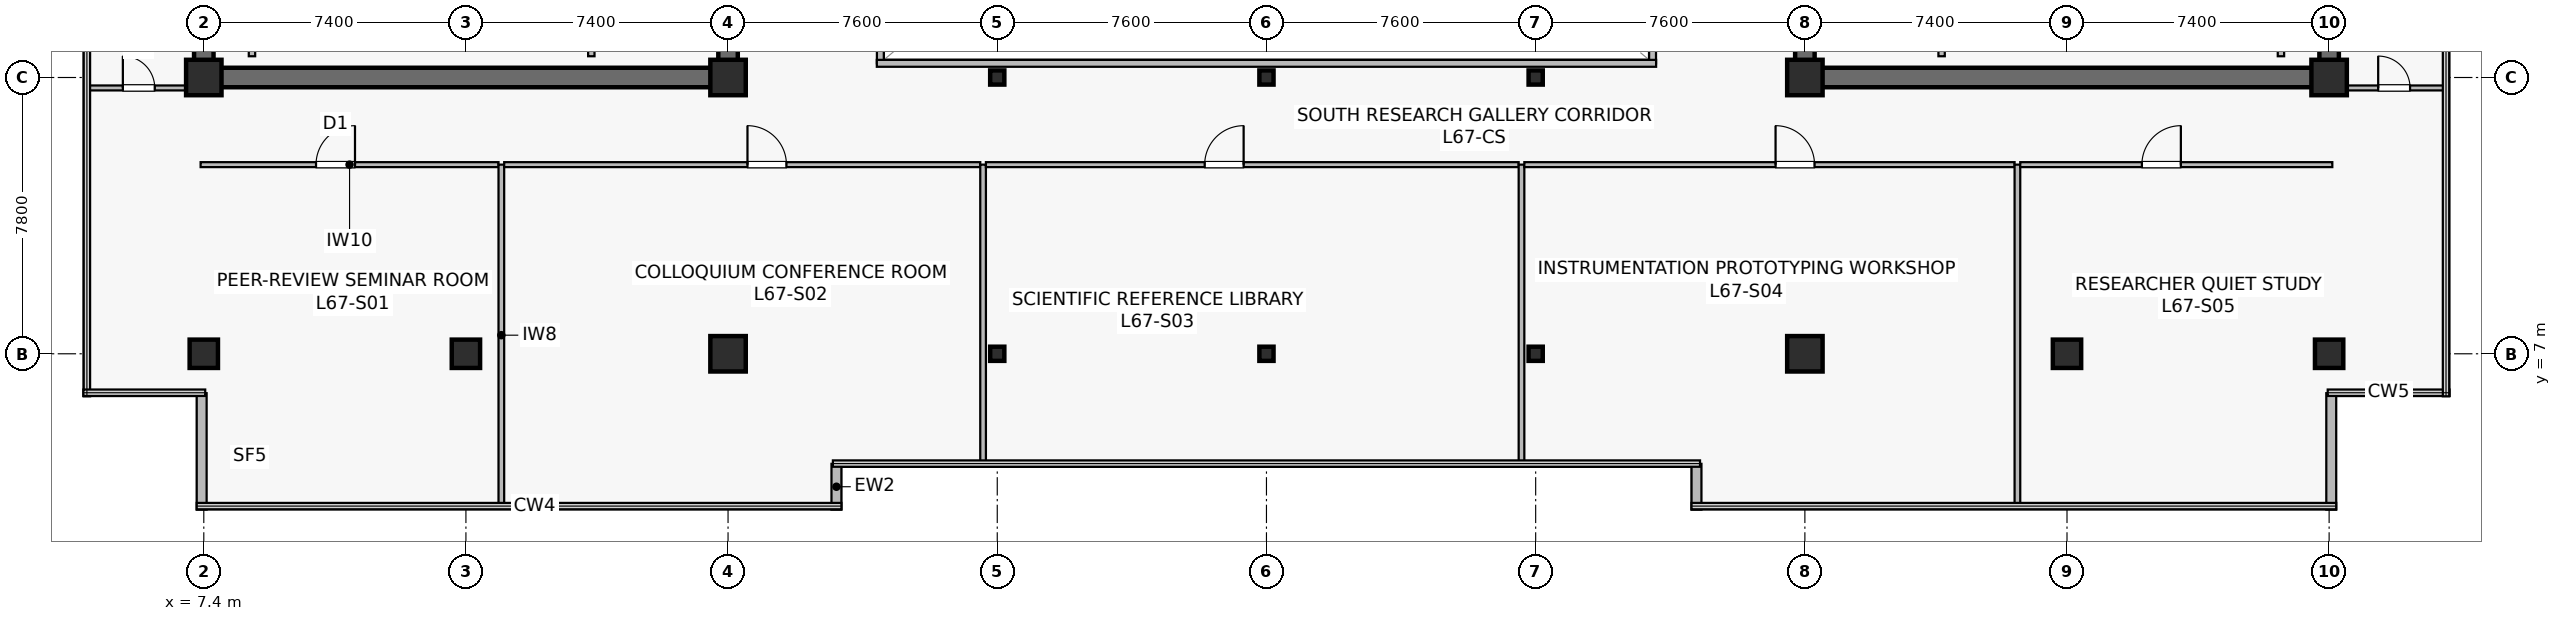
"""IFC4 building model, lengths in metres.
Left out: names, types, materials, properties, quantities, classifications, styles, units other than length and angle.
Written with IfcOpenShell. Run it as: python <this file> out.ifc"""

import sys

from ifc_helpers import new_model, si_unit, direction, frame, frame_2d, origin, origin_2d, place, context, subcontext, project, spatial, rectangle, hollow_rectangle, extrude, source, transform, mapped, element, fill, save


model = new_model("IFC4")
c1 = context("Model", 3, precision=1e-05, world=origin(), true_north=direction((0.0, 1.0)))
c2 = subcontext(c1, "Body", "Model", "MODEL_VIEW")
j1 = project(units=[si_unit("LENGTHUNIT", "METRE"), si_unit("PLANEANGLEUNIT", "RADIAN")], contexts=[c1])
p1 = place(None, origin())
s1 = spatial("IfcSite", under=j1, at=p1, CompositionType="ELEMENT")
p2 = place(p1, origin())
s2 = spatial("IfcBuilding", under=s1, at=p2, CompositionType="ELEMENT")
p3 = place(p2, frame((0.0, 0.0, 279.3)))
s3 = spatial("IfcBuildingStorey", under=s2, at=p3, CompositionType="ELEMENT", Elevation=279.3)
p4 = place(p3, frame((7.125, 14.8, 0.0), z_axis=(0.0, 0.0, 1.0), x_axis=(1.0, 0.0, 0.0)))
e1 = element("IfcWall", 1, at=p4, inside=s3, PredefinedType="SHEAR", context=c2, shape_type="SweptSolid", body=[
    extrude(rectangle(XDim=15.35, YDim=0.55, at=frame_2d((7.675, 0.0))), origin(), (0.0, 0.0, 1.0), 3.8),
])
p5 = place(p3, frame((7.4, 15.075, 0.0), z_axis=(0.0, 0.0, 1.0), x_axis=(0.0, 1.0, 0.0)))
e2 = element("IfcWall", 2, at=p5, inside=s3, PredefinedType="SHEAR", context=c2, shape_type="SweptSolid", body=[
    extrude(rectangle(XDim=18.45, YDim=0.55, at=frame_2d((9.225, 0.0))), origin(), (0.0, 0.0, 1.0), 3.8),
])
p6 = place(p3, frame((22.2, 15.075, 0.0), z_axis=(0.0, 0.0, 1.0), x_axis=(0.0, 1.0, 0.0)))
e3 = element("IfcWall", 3, at=p6, inside=s3, PredefinedType="SHEAR", context=c2, shape_type="SweptSolid", body=[
    extrude(rectangle(XDim=18.45, YDim=0.55, at=frame_2d((9.225, 0.0))), origin(), (0.0, 0.0, 1.0), 3.8),
])
p7 = place(p6, frame((3.475, 0.0, 0.0)))
e4 = element("IfcOpeningElement", 4, at=p7, cuts=e3, PredefinedType="OPENING", context=c2, shape_type="SweptSolid", body=[
    extrude(rectangle(XDim=1.42, YDim=2.2, at=frame_2d((0.71, 1.1))), frame((0.0, 0.285, 0.0), z_axis=(0.0, -1.0, 0.0), x_axis=(1.0, 0.0, 0.0)), (0.0, 0.0, 1.0), 0.57),
])
p8 = place(p3, frame((52.325, 14.8, 0.0), z_axis=(0.0, 0.0, 1.0), x_axis=(1.0, 0.0, 0.0)))
e5 = element("IfcWall", 5, at=p8, inside=s3, PredefinedType="SHEAR", context=c2, shape_type="SweptSolid", body=[
    extrude(rectangle(XDim=15.35, YDim=0.55, at=frame_2d((7.675, 0.0))), origin(), (0.0, 0.0, 1.0), 3.8),
])
p9 = place(p3, frame((52.6, 15.075, 0.0), z_axis=(0.0, 0.0, 1.0), x_axis=(0.0, 1.0, 0.0)))
e6 = element("IfcWall", 6, at=p9, inside=s3, PredefinedType="SHEAR", context=c2, shape_type="SweptSolid", body=[
    extrude(rectangle(XDim=18.45, YDim=0.55, at=frame_2d((9.225, 0.0))), origin(), (0.0, 0.0, 1.0), 3.8),
])
p10 = place(p9, frame((3.475, 0.0, 0.0)))
e7 = element("IfcOpeningElement", 7, at=p10, cuts=e6, PredefinedType="OPENING", context=c2, shape_type="SweptSolid", body=[
    extrude(rectangle(XDim=1.42, YDim=2.2, at=frame_2d((0.71, 1.1))), frame((0.0, 0.285, 0.0), z_axis=(0.0, -1.0, 0.0), x_axis=(1.0, 0.0, 0.0)), (0.0, 0.0, 1.0), 0.57),
])
p11 = place(p3, frame((67.4, 15.075, 0.0), z_axis=(0.0, 0.0, 1.0), x_axis=(0.0, 1.0, 0.0)))
e8 = element("IfcWall", 8, at=p11, inside=s3, PredefinedType="SHEAR", context=c2, shape_type="SweptSolid", body=[
    extrude(rectangle(XDim=18.45, YDim=0.55, at=frame_2d((9.225, 0.0))), origin(), (0.0, 0.0, 1.0), 3.8),
])
m1 = source(origin(), c2, "Body", "SweptSolid", [
    extrude(rectangle(XDim=0.8, YDim=0.8, at=origin_2d()), origin(), (0.0, 0.0, 1.0), 4.1),
])
p12 = place(p3, frame((14.8, 7.0, 0.0), z_axis=(0.0, 0.0, 1.0), x_axis=(1.0, 0.0, 0.0)))
e9 = element("IfcColumn", 9, at=p12, inside=s3, PredefinedType="COLUMN", context=c2, shape_type="MappedRepresentation", body=[
    mapped(m1, transform((0.0, 0.0, 0.0), scale=1.0)),
])
m2 = source(origin(), c2, "Body", "SweptSolid", [
    extrude(rectangle(XDim=1.0, YDim=1.0, at=origin_2d()), origin(), (0.0, 0.0, 1.0), 4.1),
])
for number, where, z_axis, x_axis in (
    (10, (22.2, 7.0, 0.0), (0.0, 0.0, 1.0), (1.0, 0.0, 0.0)),
    (11, (7.4, 14.8, 0.0), (0.0, 0.0, 1.0), (1.0, 0.0, 0.0)),
    (12, (22.2, 14.8, 0.0), (0.0, 0.0, 1.0), (1.0, 0.0, 0.0)),
    (13, (52.6, 7.0, 0.0), (0.0, 0.0, 1.0), (1.0, 0.0, 0.0)),
):
    element("IfcColumn", number, at=place(p3, frame(where, z_axis=z_axis, x_axis=x_axis)), inside=s3, PredefinedType="COLUMN", context=c2, shape_type="MappedRepresentation", body=[
        mapped(m2, transform((0.0, 0.0, 0.0), scale=1.0)),
    ])
p13 = place(p3, frame((60.0, 7.0, 0.0), z_axis=(0.0, 0.0, 1.0), x_axis=(1.0, 0.0, 0.0)))
e14 = element("IfcColumn", 14, at=p13, inside=s3, PredefinedType="COLUMN", context=c2, shape_type="MappedRepresentation", body=[
    mapped(m1, transform((0.0, 0.0, 0.0), scale=1.0)),
])
for number, where, z_axis, x_axis in (
    (15, (52.6, 14.8, 0.0), (0.0, 0.0, 1.0), (1.0, 0.0, 0.0)),
    (16, (67.4, 14.8, 0.0), (0.0, 0.0, 1.0), (1.0, 0.0, 0.0)),
):
    element("IfcColumn", number, at=place(p3, frame(where, z_axis=z_axis, x_axis=x_axis)), inside=s3, PredefinedType="COLUMN", context=c2, shape_type="MappedRepresentation", body=[
        mapped(m2, transform((0.0, 0.0, 0.0), scale=1.0)),
    ])
for number, where, z_axis, x_axis in (
    (17, (7.4, 7.0, 0.0), (0.0, 0.0, 1.0), (1.0, 0.0, 0.0)),
    (18, (67.4, 7.0, 0.0), (0.0, 0.0, 1.0), (1.0, 0.0, 0.0)),
):
    element("IfcColumn", number, at=place(p3, frame(where, z_axis=z_axis, x_axis=x_axis)), inside=s3, PredefinedType="COLUMN", context=c2, shape_type="MappedRepresentation", body=[
        mapped(m1, transform((0.0, 0.0, 0.0), scale=1.0)),
    ])
m3 = source(origin(), c2, "Body", "SweptSolid", [
    extrude(hollow_rectangle(XDim=0.4, YDim=0.4, WallThickness=0.019, at=origin_2d()), origin(), (0.0, 0.0, 1.0), 4.1),
])
for number, where, z_axis, x_axis in (
    (19, (29.8, 7.0, 0.0), (0.0, 0.0, 1.0), (1.0, 0.0, 0.0)),
    (20, (29.8, 14.8, 0.0), (0.0, 0.0, 1.0), (1.0, 0.0, 0.0)),
    (21, (37.4, 7.0, 0.0), (0.0, 0.0, 1.0), (1.0, 0.0, 0.0)),
    (22, (37.4, 14.8, 0.0), (0.0, 0.0, 1.0), (1.0, 0.0, 0.0)),
    (23, (45.0, 7.0, 0.0), (0.0, 0.0, 1.0), (1.0, 0.0, 0.0)),
    (24, (45.0, 14.8, 0.0), (0.0, 0.0, 1.0), (1.0, 0.0, 0.0)),
):
    element("IfcColumn", number, at=place(p3, frame(where, z_axis=z_axis, x_axis=x_axis)), inside=s3, PredefinedType="COLUMN", context=c2, shape_type="MappedRepresentation", body=[
        mapped(m3, transform((0.0, 0.0, 0.0), scale=1.0)),
    ])
for number, where, z_axis, x_axis in (
    (25, (25.26, 2.6, 0.0), (0.0, 0.0, 1.0), (0.0, 1.0, 0.0)),
    (26, (49.54, 3.893, 0.0), (0.0, 0.0, 1.0), (0.0, -1.0, 0.0)),
):
    element("IfcWall", number, at=place(p3, frame(where, z_axis=z_axis, x_axis=x_axis)), inside=s3, PredefinedType="STANDARD", context=c2, shape_type="SweptSolid", body=[
        extrude(rectangle(XDim=1.293, YDim=0.28, at=frame_2d((0.646, 0.0))), origin(), (0.0, 0.0, 1.0), 3.8),
    ])
for number, where, z_axis, x_axis in (
    (27, (67.46, 2.6, 0.0), (0.0, 0.0, 1.0), (0.0, 1.0, 0.0)),
    (28, (7.34, 5.888, 0.0), (0.0, 0.0, 1.0), (0.0, -1.0, 0.0)),
):
    element("IfcWall", number, at=place(p3, frame(where, z_axis=z_axis, x_axis=x_axis)), inside=s3, PredefinedType="STANDARD", context=c2, shape_type="SweptSolid", body=[
        extrude(rectangle(XDim=3.288, YDim=0.28, at=frame_2d((1.644, 0.0))), origin(), (0.0, 0.0, 1.0), 3.8),
    ])
for number, where, z_axis, x_axis in (
    (29, (18.34, 15.4, 0.0), (0.0, 0.0, 1.0), (0.0, 1.0, 0.0)),
    (30, (8.76, 15.4, 0.0), (0.0, 0.0, 1.0), (0.0, 1.0, 0.0)),
    (31, (56.46, 15.4, 0.0), (0.0, 0.0, 1.0), (0.0, 1.0, 0.0)),
    (32, (66.04, 15.4, 0.0), (0.0, 0.0, 1.0), (0.0, 1.0, 0.0)),
):
    element("IfcWall", number, at=place(p3, frame(where, z_axis=z_axis, x_axis=x_axis)), inside=s3, PredefinedType="SOLIDWALL", context=c2, shape_type="SweptSolid", body=[
        extrude(rectangle(XDim=2.4, YDim=0.18, at=frame_2d((1.2, 0.0))), origin(), (0.0, 0.0, 1.0), 3.8),
    ])
p14 = place(p3, frame((26.5, 15.2, 0.0), z_axis=(0.0, 0.0, 1.0), x_axis=(0.0, 1.0, 0.0)))
e33 = element("IfcWall", 33, at=p14, inside=s3, PredefinedType="SOLIDWALL", context=c2, shape_type="SweptSolid", body=[
    extrude(rectangle(XDim=18.2, YDim=0.195, at=frame_2d((9.1, 0.0))), origin(), (0.0, 0.0, 1.0), 3.8),
])
p15 = place(p14, frame((1.8, 0.0, 0.9)))
e34 = element("IfcOpeningElement", 34, at=p15, cuts=e33, PredefinedType="OPENING", context=c2, shape_type="SweptSolid", body=[
    extrude(rectangle(XDim=1.2, YDim=1.35, at=frame_2d((0.6, 0.675))), frame((0.0, 0.107, 0.0), z_axis=(0.0, -1.0, 0.0), x_axis=(1.0, 0.0, 0.0)), (0.0, 0.0, 1.0), 0.215),
])
p16 = place(p14, frame((13.2, 0.0, 0.9)))
e35 = element("IfcOpeningElement", 35, at=p16, cuts=e33, PredefinedType="OPENING", context=c2, shape_type="SweptSolid", body=[
    extrude(rectangle(XDim=1.2, YDim=1.35, at=frame_2d((0.6, 0.675))), frame((0.0, 0.107, 0.0), z_axis=(0.0, -1.0, 0.0), x_axis=(1.0, 0.0, 0.0)), (0.0, 0.0, 1.0), 0.215),
])
p17 = place(p3, frame((48.3, 15.2, 0.0), z_axis=(0.0, 0.0, 1.0), x_axis=(0.0, 1.0, 0.0)))
e36 = element("IfcWall", 36, at=p17, inside=s3, PredefinedType="SOLIDWALL", context=c2, shape_type="SweptSolid", body=[
    extrude(rectangle(XDim=18.2, YDim=0.195, at=frame_2d((9.1, 0.0))), origin(), (0.0, 0.0, 1.0), 3.8),
])
p18 = place(p17, frame((1.8, 0.0, 0.9)))
e37 = element("IfcOpeningElement", 37, at=p18, cuts=e36, PredefinedType="OPENING", context=c2, shape_type="SweptSolid", body=[
    extrude(rectangle(XDim=1.2, YDim=1.35, at=frame_2d((0.6, 0.675))), frame((0.0, 0.107, 0.0), z_axis=(0.0, -1.0, 0.0), x_axis=(1.0, 0.0, 0.0)), (0.0, 0.0, 1.0), 0.215),
])
p19 = place(p17, frame((13.2, 0.0, 0.9)))
e38 = element("IfcOpeningElement", 38, at=p19, cuts=e36, PredefinedType="OPENING", context=c2, shape_type="SweptSolid", body=[
    extrude(rectangle(XDim=1.2, YDim=1.35, at=frame_2d((0.6, 0.675))), frame((0.0, 0.107, 0.0), z_axis=(0.0, -1.0, 0.0), x_axis=(1.0, 0.0, 0.0)), (0.0, 0.0, 1.0), 0.215),
])
p20 = place(p3, frame((26.4, 15.2, 0.0), z_axis=(0.0, 0.0, 1.0), x_axis=(1.0, 0.0, 0.0)))
e39 = element("IfcWall", 39, at=p20, inside=s3, PredefinedType="SOLIDWALL", context=c2, shape_type="SweptSolid", body=[
    extrude(rectangle(XDim=22.0, YDim=0.195, at=frame_2d((11.0, 0.0))), origin(), (0.0, 0.0, 1.0), 3.8),
])
p21 = place(p3, frame((7.31, 12.34, 0.0), z_axis=(0.0, 0.0, 1.0), x_axis=(1.0, 0.0, 0.0)))
e40 = element("IfcWall", 40, at=p21, inside=s3, PredefinedType="PARTITIONING", context=c2, shape_type="SweptSolid", body=[
    extrude(rectangle(XDim=8.41, YDim=0.14, at=frame_2d((4.205, 0.0))), origin(), (0.0, 0.0, 1.0), 3.197),
])
p22 = place(p21, frame((3.258, 0.0, 0.0)))
e41 = element("IfcOpeningElement", 41, at=p22, cuts=e40, PredefinedType="OPENING", context=c2, shape_type="SweptSolid", body=[
    extrude(rectangle(XDim=1.1, YDim=2.18, at=frame_2d((0.55, 1.09))), frame((0.0, 0.08, 0.0), z_axis=(0.0, -1.0, 0.0), x_axis=(1.0, 0.0, 0.0)), (0.0, 0.0, 1.0), 0.16),
])
p23 = place(p3, frame((15.8, 2.71, 0.0), z_axis=(0.0, 0.0, 1.0), x_axis=(0.0, 1.0, 0.0)))
e42 = element("IfcWall", 42, at=p23, inside=s3, PredefinedType="PARTITIONING", context=c2, shape_type="SweptSolid", body=[
    extrude(rectangle(XDim=9.63, YDim=0.16, at=frame_2d((4.815, 0.0))), origin(), (0.0, 0.0, 1.0), 3.135),
])
p24 = place(p3, frame((15.88, 12.34, 0.0), z_axis=(0.0, 0.0, 1.0), x_axis=(1.0, 0.0, 0.0)))
e43 = element("IfcWall", 43, at=p24, inside=s3, PredefinedType="PARTITIONING", context=c2, shape_type="SweptSolid", body=[
    extrude(rectangle(XDim=13.44, YDim=0.14, at=frame_2d((6.72, 0.0))), origin(), (0.0, 0.0, 1.0), 3.197),
])
p25 = place(p24, frame((6.868, 0.0, 0.0)))
e44 = element("IfcOpeningElement", 44, at=p25, cuts=e43, PredefinedType="OPENING", context=c2, shape_type="SweptSolid", body=[
    extrude(rectangle(XDim=1.1, YDim=2.18, at=frame_2d((0.55, 1.09))), frame((0.0, 0.08, 0.0), z_axis=(0.0, -1.0, 0.0), x_axis=(1.0, 0.0, 0.0)), (0.0, 0.0, 1.0), 0.16),
])
p26 = place(p3, frame((29.4, 3.91, 0.0), z_axis=(0.0, 0.0, 1.0), x_axis=(0.0, 1.0, 0.0)))
e45 = element("IfcWall", 45, at=p26, inside=s3, PredefinedType="PARTITIONING", context=c2, shape_type="SweptSolid", body=[
    extrude(rectangle(XDim=8.43, YDim=0.16, at=frame_2d((4.215, 0.0))), origin(), (0.0, 0.0, 1.0), 3.135),
])
p27 = place(p3, frame((29.48, 12.34, 0.0), z_axis=(0.0, 0.0, 1.0), x_axis=(1.0, 0.0, 0.0)))
e46 = element("IfcWall", 46, at=p27, inside=s3, PredefinedType="PARTITIONING", context=c2, shape_type="SweptSolid", body=[
    extrude(rectangle(XDim=15.04, YDim=0.14, at=frame_2d((7.52, 0.0))), origin(), (0.0, 0.0, 1.0), 3.197),
])
p28 = place(p27, frame((6.176, 0.0, 0.0)))
e47 = element("IfcOpeningElement", 47, at=p28, cuts=e46, PredefinedType="OPENING", context=c2, shape_type="SweptSolid", body=[
    extrude(rectangle(XDim=1.1, YDim=2.18, at=frame_2d((0.55, 1.09))), frame((0.0, 0.08, 0.0), z_axis=(0.0, -1.0, 0.0), x_axis=(1.0, 0.0, 0.0)), (0.0, 0.0, 1.0), 0.16),
])
p29 = place(p3, frame((44.6, 3.91, 0.0), z_axis=(0.0, 0.0, 1.0), x_axis=(0.0, 1.0, 0.0)))
e48 = element("IfcWall", 48, at=p29, inside=s3, PredefinedType="PARTITIONING", context=c2, shape_type="SweptSolid", body=[
    extrude(rectangle(XDim=8.43, YDim=0.16, at=frame_2d((4.215, 0.0))), origin(), (0.0, 0.0, 1.0), 3.135),
])
p30 = place(p3, frame((44.68, 12.34, 0.0), z_axis=(0.0, 0.0, 1.0), x_axis=(1.0, 0.0, 0.0)))
e49 = element("IfcWall", 49, at=p30, inside=s3, PredefinedType="PARTITIONING", context=c2, shape_type="SweptSolid", body=[
    extrude(rectangle(XDim=13.84, YDim=0.14, at=frame_2d((6.92, 0.0))), origin(), (0.0, 0.0, 1.0), 3.197),
])
p31 = place(p30, frame((7.092, 0.0, 0.0)))
e50 = element("IfcOpeningElement", 50, at=p31, cuts=e49, PredefinedType="OPENING", context=c2, shape_type="SweptSolid", body=[
    extrude(rectangle(XDim=1.1, YDim=2.18, at=frame_2d((0.55, 1.09))), frame((0.0, 0.08, 0.0), z_axis=(0.0, -1.0, 0.0), x_axis=(1.0, 0.0, 0.0)), (0.0, 0.0, 1.0), 0.16),
])
p32 = place(p3, frame((58.6, 2.71, 0.0), z_axis=(0.0, 0.0, 1.0), x_axis=(0.0, 1.0, 0.0)))
e51 = element("IfcWall", 51, at=p32, inside=s3, PredefinedType="PARTITIONING", context=c2, shape_type="SweptSolid", body=[
    extrude(rectangle(XDim=9.63, YDim=0.16, at=frame_2d((4.815, 0.0))), origin(), (0.0, 0.0, 1.0), 3.135),
])
p33 = place(p3, frame((58.68, 12.34, 0.0), z_axis=(0.0, 0.0, 1.0), x_axis=(1.0, 0.0, 0.0)))
e52 = element("IfcWall", 52, at=p33, inside=s3, PredefinedType="PARTITIONING", context=c2, shape_type="SweptSolid", body=[
    extrude(rectangle(XDim=8.81, YDim=0.14, at=frame_2d((4.405, 0.0))), origin(), (0.0, 0.0, 1.0), 3.197),
])
p34 = place(p33, frame((3.434, 0.0, 0.0)))
e53 = element("IfcOpeningElement", 53, at=p34, cuts=e52, PredefinedType="OPENING", context=c2, shape_type="SweptSolid", body=[
    extrude(rectangle(XDim=1.1, YDim=2.18, at=frame_2d((0.55, 1.09))), frame((0.0, 0.08, 0.0), z_axis=(0.0, -1.0, 0.0), x_axis=(1.0, 0.0, 0.0)), (0.0, 0.0, 1.0), 0.16),
])
p35 = place(p3, frame((4.11, 14.505, 0.0), z_axis=(0.0, 0.0, 1.0), x_axis=(1.0, 0.0, 0.0)))
e54 = element("IfcWall", 54, at=p35, inside=s3, PredefinedType="PARTITIONING", context=c2, shape_type="SweptSolid", body=[
    extrude(rectangle(XDim=2.91, YDim=0.14, at=frame_2d((1.455, 0.0))), origin(), (0.0, 0.0, 1.0), 3.8),
])
p36 = place(p35, frame((1.005, 0.0, 0.0)))
e55 = element("IfcOpeningElement", 55, at=p36, cuts=e54, PredefinedType="OPENING", context=c2, shape_type="SweptSolid", body=[
    extrude(rectangle(XDim=0.9, YDim=2.1, at=frame_2d((0.45, 1.05))), frame((0.0, 0.08, 0.0), z_axis=(0.0, -1.0, 0.0), x_axis=(1.0, 0.0, 0.0)), (0.0, 0.0, 1.0), 0.16),
])
p37 = place(p3, frame((67.78, 14.505, 0.0), z_axis=(0.0, 0.0, 1.0), x_axis=(1.0, 0.0, 0.0)))
e56 = element("IfcWall", 56, at=p37, inside=s3, PredefinedType="PARTITIONING", context=c2, shape_type="SweptSolid", body=[
    extrude(rectangle(XDim=2.91, YDim=0.14, at=frame_2d((1.455, 0.0))), origin(), (0.0, 0.0, 1.0), 3.8),
])
p38 = place(p37, frame((1.005, 0.0, 0.0)))
e57 = element("IfcOpeningElement", 57, at=p38, cuts=e56, PredefinedType="OPENING", context=c2, shape_type="SweptSolid", body=[
    extrude(rectangle(XDim=0.9, YDim=2.1, at=frame_2d((0.45, 1.05))), frame((0.0, 0.08, 0.0), z_axis=(0.0, -1.0, 0.0), x_axis=(1.0, 0.0, 0.0)), (0.0, 0.0, 1.0), 0.16),
])
m4 = source(origin(), c2, "Body", "SweptSolid", [
    extrude(rectangle(XDim=1.1, YDim=2.18, at=frame_2d((0.55, 1.09))), frame((0.0, 0.025, 0.0), z_axis=(0.0, -1.0, 0.0), x_axis=(1.0, 0.0, 0.0)), (0.0, 0.0, 1.0), 0.05),
])
p39 = place(p22, origin())
e58 = element("IfcDoor", 58, at=p39, inside=s3, OperationType="SINGLE_SWING_RIGHT", PredefinedType="DOOR", context=c2, shape_type="MappedRepresentation", body=[
    mapped(m4, transform((0.0, 0.0, 0.0), scale=1.0)),
])
fill(e41, e58)
p40 = place(p25, origin())
e59 = element("IfcDoor", 59, at=p40, inside=s3, OperationType="SINGLE_SWING_LEFT", PredefinedType="DOOR", context=c2, shape_type="MappedRepresentation", body=[
    mapped(m4, transform((0.0, 0.0, 0.0), scale=1.0)),
])
fill(e44, e59)
p41 = place(p28, origin())
e60 = element("IfcDoor", 60, at=p41, inside=s3, OperationType="SINGLE_SWING_RIGHT", PredefinedType="DOOR", context=c2, shape_type="MappedRepresentation", body=[
    mapped(m4, transform((0.0, 0.0, 0.0), scale=1.0)),
])
fill(e47, e60)
p42 = place(p31, origin())
e61 = element("IfcDoor", 61, at=p42, inside=s3, OperationType="SINGLE_SWING_LEFT", PredefinedType="DOOR", context=c2, shape_type="MappedRepresentation", body=[
    mapped(m4, transform((0.0, 0.0, 0.0), scale=1.0)),
])
fill(e50, e61)
p43 = place(p34, origin())
e62 = element("IfcDoor", 62, at=p43, inside=s3, OperationType="SINGLE_SWING_RIGHT", PredefinedType="DOOR", context=c2, shape_type="MappedRepresentation", body=[
    mapped(m4, transform((0.0, 0.0, 0.0), scale=1.0)),
])
fill(e53, e62)
m5 = source(origin(), c2, "Body", "SweptSolid", [
    extrude(rectangle(XDim=0.9, YDim=2.1, at=frame_2d((0.45, 1.05))), frame((0.0, 0.025, 0.0), z_axis=(0.0, -1.0, 0.0), x_axis=(1.0, 0.0, 0.0)), (0.0, 0.0, 1.0), 0.05),
])
p44 = place(p36, origin())
e63 = element("IfcDoor", 63, at=p44, inside=s3, OperationType="SINGLE_SWING_LEFT", PredefinedType="DOOR", context=c2, shape_type="MappedRepresentation", body=[
    mapped(m5, transform((0.0, 0.0, 0.0), scale=1.0)),
])
fill(e55, e63)
p45 = place(p38, origin())
e64 = element("IfcDoor", 64, at=p45, inside=s3, OperationType="SINGLE_SWING_LEFT", PredefinedType="DOOR", context=c2, shape_type="MappedRepresentation", body=[
    mapped(m5, transform((0.0, 0.0, 0.0), scale=1.0)),
])
fill(e57, e64)
save(model, sys.argv[1])
